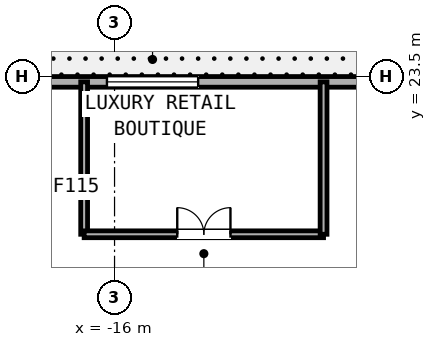
"""IFC4 building model, lengths in metres.
Left out: names, types, materials, properties, quantities, classifications, styles, units other than length and angle.
Written with IfcOpenShell. Run it as: python <this file> out.ifc"""

import sys

from ifc_helpers import new_model, si_unit, direction, frame, frame_2d, origin, place, context, subcontext, project, spatial, rectangle, extrude, element, fill, save


model = new_model("IFC4")
c1 = context("Model", 3, precision=1e-05, world=origin(), true_north=direction((0.0, 1.0)))
c2 = subcontext(c1, "Body", "Model", "MODEL_VIEW")
j1 = project(units=[si_unit("LENGTHUNIT", "METRE"), si_unit("PLANEANGLEUNIT", "RADIAN")], contexts=[c1])
p1 = place(None, origin())
s1 = spatial("IfcSite", under=j1, at=p1, CompositionType="ELEMENT")
p2 = place(p1, origin())
s2 = spatial("IfcBuilding", under=s1, at=p2, CompositionType="ELEMENT")
p3 = place(p2, origin())
s3 = spatial("IfcBuildingStorey", under=s2, at=p3, CompositionType="ELEMENT", Elevation=0.0)
p4 = place(p3, frame((-32.4, 23.36, 0.0), z_axis=(0.0, 0.0, 1.0), x_axis=(1.0, 0.0, 0.0)))
e1 = element("IfcWall", 1, at=p4, inside=s3, PredefinedType="STANDARD", context=c2, shape_type="SweptSolid", body=[
    extrude(rectangle(XDim=64.8, YDim=0.28, at=frame_2d((32.4, 0.0))), origin(), (0.0, 0.0, 1.0), 5.1),
])
p5 = place(p4, frame((8.6, 0.0, 0.0)))
e2 = element("IfcOpeningElement", 2, at=p5, cuts=e1, PredefinedType="OPENING", context=c2, shape_type="SweptSolid", body=[
    extrude(rectangle(XDim=2.0, YDim=2.35, at=frame_2d((1.0, 1.175))), frame((0.0, 0.15, 0.0), z_axis=(0.0, -1.0, 0.0), x_axis=(1.0, 0.0, 0.0)), (0.0, 0.0, 1.0), 0.3),
])
p6 = place(p4, frame((26.9, 0.0, 0.0)))
e3 = element("IfcOpeningElement", 3, at=p6, cuts=e1, PredefinedType="OPENING", context=c2, shape_type="SweptSolid", body=[
    extrude(rectangle(XDim=2.0, YDim=2.35, at=frame_2d((1.0, 1.175))), frame((0.0, 0.15, 0.0), z_axis=(0.0, -1.0, 0.0), x_axis=(1.0, 0.0, 0.0)), (0.0, 0.0, 1.0), 0.3),
])
p7 = place(p4, frame((35.9, 0.0, 0.0)))
e4 = element("IfcOpeningElement", 4, at=p7, cuts=e1, PredefinedType="OPENING", context=c2, shape_type="SweptSolid", body=[
    extrude(rectangle(XDim=2.0, YDim=2.35, at=frame_2d((1.0, 1.175))), frame((0.0, 0.15, 0.0), z_axis=(0.0, -1.0, 0.0), x_axis=(1.0, 0.0, 0.0)), (0.0, 0.0, 1.0), 0.3),
])
p8 = place(p4, frame((47.9, 0.0, 0.0)))
e5 = element("IfcOpeningElement", 5, at=p8, cuts=e1, PredefinedType="OPENING", context=c2, shape_type="SweptSolid", body=[
    extrude(rectangle(XDim=2.0, YDim=2.35, at=frame_2d((1.0, 1.175))), frame((0.0, 0.15, 0.0), z_axis=(0.0, -1.0, 0.0), x_axis=(1.0, 0.0, 0.0)), (0.0, 0.0, 1.0), 0.3),
])
p9 = place(p4, frame((61.2, 0.0, 0.0)))
e6 = element("IfcOpeningElement", 6, at=p9, cuts=e1, PredefinedType="OPENING", context=c2, shape_type="SweptSolid", body=[
    extrude(rectangle(XDim=2.0, YDim=2.35, at=frame_2d((1.0, 1.175))), frame((0.0, 0.15, 0.0), z_axis=(0.0, -1.0, 0.0), x_axis=(1.0, 0.0, 0.0)), (0.0, 0.0, 1.0), 0.3),
])
p10 = place(p4, frame((0.3, 0.0, 0.0)))
e7 = element("IfcOpeningElement", 7, at=p10, cuts=e1, PredefinedType="OPENING", context=c2, shape_type="SweptSolid", body=[
    extrude(rectangle(XDim=5.2, YDim=3.1, at=frame_2d((2.6, 1.55))), frame((0.0, 0.15, 0.0), z_axis=(0.0, -1.0, 0.0), x_axis=(1.0, 0.0, 0.0)), (0.0, 0.0, 1.0), 0.3),
])
p11 = place(p4, frame((16.2, 0.0, 0.85)))
e8 = element("IfcOpeningElement", 8, at=p11, cuts=e1, PredefinedType="OPENING", context=c2, shape_type="SweptSolid", body=[
    extrude(rectangle(XDim=2.4, YDim=2.1, at=frame_2d((1.2, 1.05))), frame((0.0, 0.15, 0.0), z_axis=(0.0, -1.0, 0.0), x_axis=(1.0, 0.0, 0.0)), (0.0, 0.0, 1.0), 0.3),
])
p12 = place(p4, frame((31.2, 0.0, 0.85)))
e9 = element("IfcOpeningElement", 9, at=p12, cuts=e1, PredefinedType="OPENING", context=c2, shape_type="SweptSolid", body=[
    extrude(rectangle(XDim=2.4, YDim=2.1, at=frame_2d((1.2, 1.05))), frame((0.0, 0.15, 0.0), z_axis=(0.0, -1.0, 0.0), x_axis=(1.0, 0.0, 0.0)), (0.0, 0.0, 1.0), 0.3),
])
p13 = place(p4, frame((40.7, 0.0, 0.85)))
e10 = element("IfcOpeningElement", 10, at=p13, cuts=e1, PredefinedType="OPENING", context=c2, shape_type="SweptSolid", body=[
    extrude(rectangle(XDim=2.4, YDim=2.1, at=frame_2d((1.2, 1.05))), frame((0.0, 0.15, 0.0), z_axis=(0.0, -1.0, 0.0), x_axis=(1.0, 0.0, 0.0)), (0.0, 0.0, 1.0), 0.3),
])
p14 = place(p4, frame((54.7, 0.0, 0.85)))
e11 = element("IfcOpeningElement", 11, at=p14, cuts=e1, PredefinedType="OPENING", context=c2, shape_type="SweptSolid", body=[
    extrude(rectangle(XDim=2.4, YDim=2.1, at=frame_2d((1.2, 1.05))), frame((0.0, 0.15, 0.0), z_axis=(0.0, -1.0, 0.0), x_axis=(1.0, 0.0, 0.0)), (0.0, 0.0, 1.0), 0.3),
])
p15 = place(p3, frame((-16.8, 19.35, 0.0), z_axis=(0.0, 0.0, 1.0), x_axis=(0.0, 1.0, 0.0)))
e12 = element("IfcWall", 12, at=p15, inside=s3, PredefinedType="PARTITIONING", context=c2, shape_type="SweptSolid", body=[
    extrude(rectangle(XDim=4.01, YDim=0.18, at=frame_2d((2.005, 0.0))), origin(), (0.0, 0.0, 1.0), 4.463),
])
p16 = place(p3, frame((-16.8, 19.35, 0.0), z_axis=(0.0, 0.0, 1.0), x_axis=(1.0, 0.0, 0.0)))
e13 = element("IfcWall", 13, at=p16, inside=s3, PredefinedType="PARTITIONING", context=c2, shape_type="SweptSolid", body=[
    extrude(rectangle(XDim=6.3, YDim=0.18, at=frame_2d((3.15, 0.0))), origin(), (0.0, 0.0, 1.0), 5.1),
])
p17 = place(p16, frame((2.45, 0.0, 0.0)))
e14 = element("IfcOpeningElement", 14, at=p17, cuts=e13, PredefinedType="OPENING", context=c2, shape_type="SweptSolid", body=[
    extrude(rectangle(XDim=1.4, YDim=2.2, at=frame_2d((0.7, 1.1))), frame((0.0, 0.1, 0.0), z_axis=(0.0, -1.0, 0.0), x_axis=(1.0, 0.0, 0.0)), (0.0, 0.0, 1.0), 0.2),
])
p18 = place(p3, frame((-10.5, 19.35, 0.0), z_axis=(0.0, 0.0, 1.0), x_axis=(0.0, 1.0, 0.0)))
e15 = element("IfcWall", 15, at=p18, inside=s3, PredefinedType="PARTITIONING", context=c2, shape_type="SweptSolid", body=[
    extrude(rectangle(XDim=4.01, YDim=0.18, at=frame_2d((2.005, 0.0))), origin(), (0.0, 0.0, 1.0), 4.463),
])
p19 = place(p11, origin())
e16 = element("IfcWindow", 16, at=p19, inside=s3, PartitioningType="SINGLE_PANEL", PredefinedType="WINDOW", context=c2, shape_type="SweptSolid", body=[
    extrude(rectangle(XDim=2.4, YDim=2.1, at=frame_2d((1.2, 1.05))), frame((0.0, 0.03, 0.0), z_axis=(0.0, -1.0, 0.0), x_axis=(1.0, 0.0, 0.0)), (0.0, 0.0, 1.0), 0.06),
])
fill(e8, e16)
p20 = place(p17, frame((1.4, 0.0, 0.0), z_axis=(0.0, 0.0, 1.0), x_axis=(-1.0, 0.0, 0.0)))
e17 = element("IfcDoor", 17, at=p20, inside=s3, OperationType="DOUBLE_DOOR_SINGLE_SWING", PredefinedType="DOOR", context=c2, shape_type="SweptSolid", body=[
    extrude(rectangle(XDim=1.4, YDim=2.2, at=frame_2d((0.7, 1.1))), frame((0.0, 0.025, 0.0), z_axis=(0.0, -1.0, 0.0), x_axis=(1.0, 0.0, 0.0)), (0.0, 0.0, 1.0), 0.05),
])
fill(e14, e17)
save(model, sys.argv[1])
